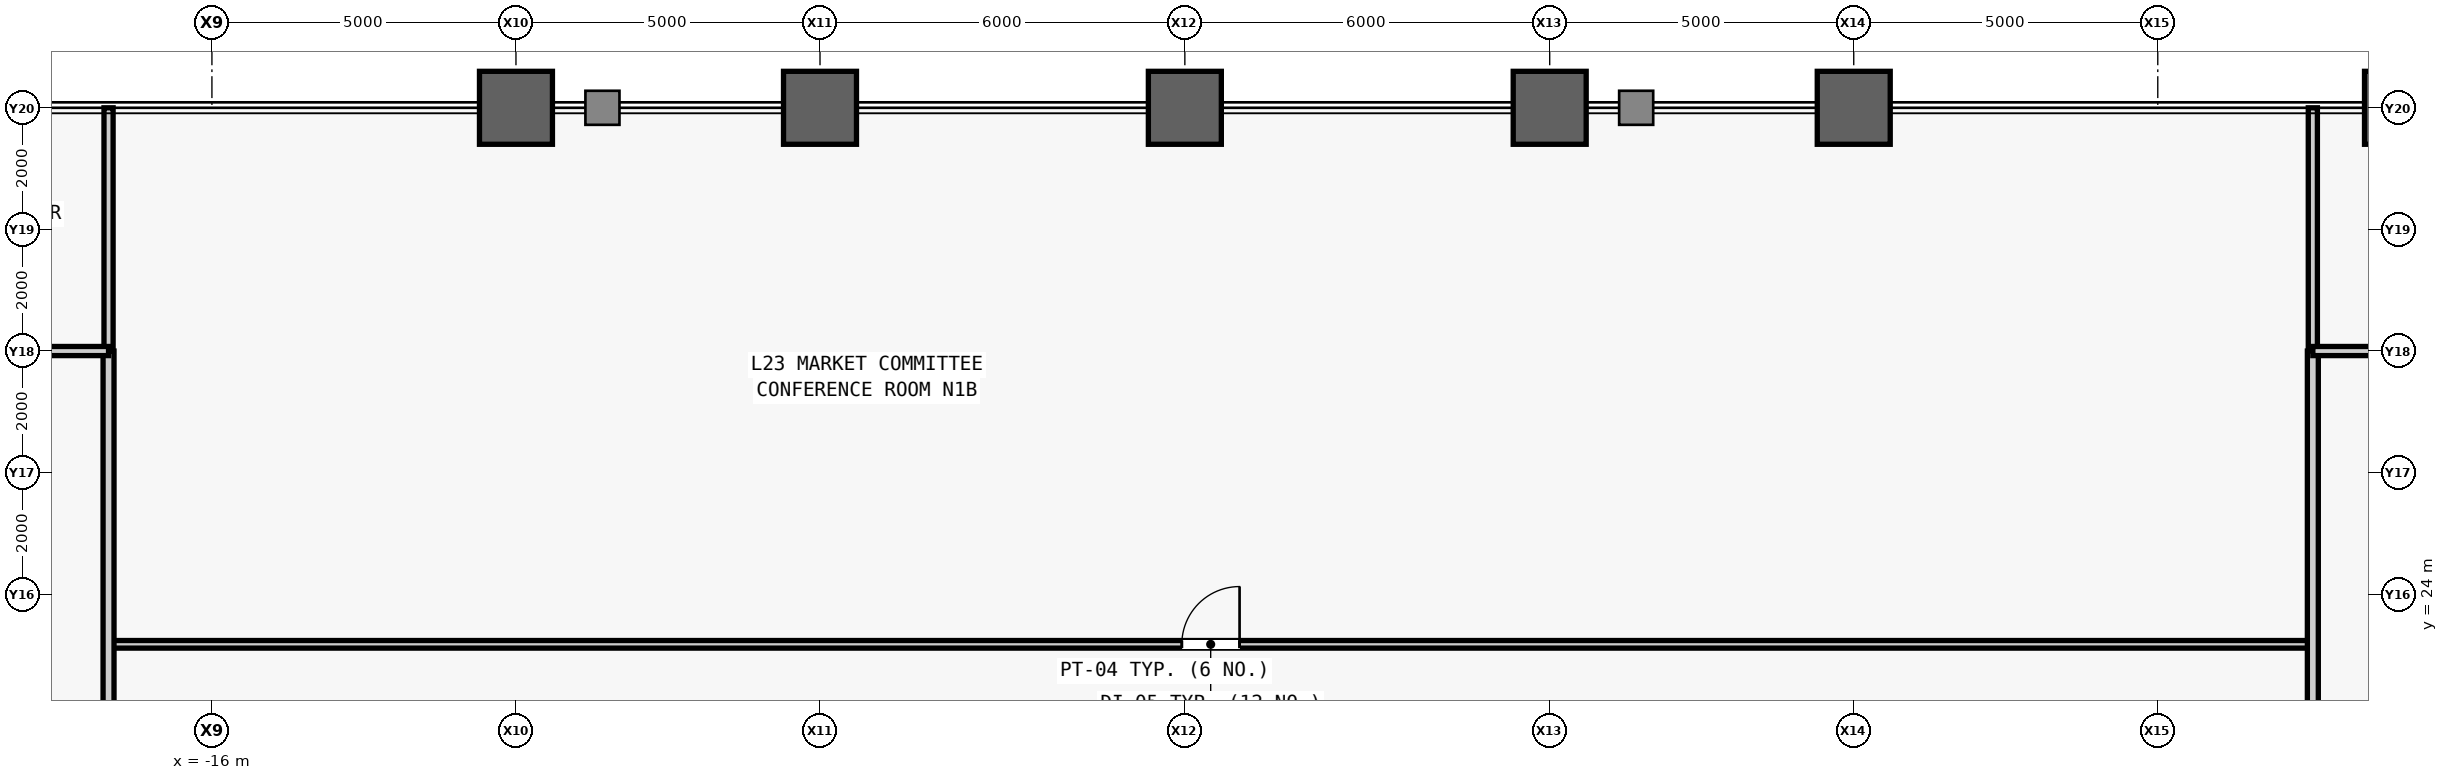
"""IFC4 building model, lengths in metres.
Left out: names, types, materials, properties, quantities, classifications, styles, units other than length and angle.
Written with IfcOpenShell. Run it as: python <this file> out.ifc"""

import sys

from ifc_helpers import new_model, si_unit, direction, frame, frame_2d, origin, origin_2d, place, context, subcontext, project, spatial, rectangle, hollow_rectangle, extrude, source, transform, mapped, element, fill, save


model = new_model("IFC4")
c1 = context("Model", 3, precision=1e-05, world=origin(), true_north=direction((0.0, 1.0)))
c2 = subcontext(c1, "Body", "Model", "MODEL_VIEW")
j1 = project(units=[si_unit("LENGTHUNIT", "METRE"), si_unit("PLANEANGLEUNIT", "RADIAN")], contexts=[c1])
p1 = place(None, origin())
s1 = spatial("IfcSite", under=j1, at=p1, CompositionType="ELEMENT")
p2 = place(p1, origin())
s2 = spatial("IfcBuilding", under=s1, at=p2, CompositionType="ELEMENT")
p3 = place(p2, frame((0.0, 0.0, 103.7)))
s3 = spatial("IfcBuildingStorey", under=s2, at=p3, CompositionType="ELEMENT", Elevation=103.7)
m1 = source(origin(), c2, "Body", "SweptSolid", [
    extrude(hollow_rectangle(XDim=1.2, YDim=1.2, WallThickness=0.07, at=origin_2d()), origin(), (0.0, 0.0, 1.0), 4.1),
])
for number, where, z_axis, x_axis in (
    (1, (-11.0, 32.0, 0.0), (0.0, 0.0, 1.0), (1.0, 0.0, 0.0)),
    (2, (-6.0, 32.0, 0.0), (0.0, 0.0, 1.0), (1.0, 0.0, 0.0)),
    (3, (0.0, 32.0, 0.0), (0.0, 0.0, 1.0), (1.0, 0.0, 0.0)),
    (4, (6.0, 32.0, 0.0), (0.0, 0.0, 1.0), (1.0, 0.0, 0.0)),
    (5, (11.0, 32.0, 0.0), (0.0, 0.0, 1.0), (1.0, 0.0, 0.0)),
    (6, (20.0, 32.0, 0.0), (0.0, 0.0, 1.0), (1.0, 0.0, 0.0)),
):
    element("IfcColumn", number, at=place(p3, frame(where, z_axis=z_axis, x_axis=x_axis)), inside=s3, PredefinedType="COLUMN", context=c2, shape_type="MappedRepresentation", body=[
        mapped(m1, transform((0.0, 0.0, 0.0), scale=1.0)),
    ])
m2 = source(origin(), c2, "Body", "SweptSolid", [
    extrude(rectangle(XDim=36.25, YDim=0.125, at=frame_2d((18.125, 0.0))), origin(), (0.0, 0.0, 1.0), 3.84),
])
p4 = place(p3, frame((-17.7, 23.177, 0.0), z_axis=(0.0, 0.0, 1.0), x_axis=(1.0, 0.0, 0.0)))
e7 = element("IfcWall", 7, at=p4, inside=s3, PredefinedType="PARTITIONING", context=c2, shape_type="MappedRepresentation", body=[
    mapped(m2, transform((0.0, 0.0, 0.0), scale=1.0)),
])
m3 = source(origin(), c2, "Body", "SweptSolid", [
    extrude(rectangle(XDim=0.95, YDim=2.15, at=frame_2d((0.475, 1.075))), frame((0.0, 0.073, 0.0), z_axis=(0.0, -1.0, 0.0), x_axis=(1.0, 0.0, 0.0)), (0.0, 0.0, 1.0), 0.145),
])
p5 = place(p4, frame((17.65, 0.0, 0.0)))
e8 = element("IfcOpeningElement", 8, at=p5, cuts=e7, PredefinedType="OPENING", context=c2, shape_type="MappedRepresentation", body=[
    mapped(m3, transform((0.0, 0.0, 0.0), scale=1.0)),
])
m4 = source(origin(), c2, "Body", "SweptSolid", [
    extrude(rectangle(XDim=4.0, YDim=0.15, at=frame_2d((2.0, 0.0))), origin(), (0.0, 0.0, 1.0), 3.84),
])
for number, where, z_axis, x_axis in (
    (9, (-17.7, 28.0, 0.0), (0.0, 0.0, 1.0), (0.0, 1.0, 0.0)),
    (10, (18.55, 28.0, 0.0), (0.0, 0.0, 1.0), (0.0, 1.0, 0.0)),
):
    element("IfcWall", number, at=place(p3, frame(where, z_axis=z_axis, x_axis=x_axis)), inside=s3, PredefinedType="PARTITIONING", context=c2, shape_type="MappedRepresentation", body=[
        mapped(m4, transform((0.0, 0.0, 0.0), scale=1.0)),
    ])
m5 = source(origin(), c2, "Body", "SweptSolid", [
    extrude(rectangle(XDim=56.0, YDim=0.18, at=frame_2d((28.0, 0.0))), origin(), (0.0, 0.0, 1.0), 3.84),
])
p6 = place(p3, frame((-17.7, -28.0, 0.0), z_axis=(0.0, 0.0, 1.0), x_axis=(0.0, 1.0, 0.0)))
e11 = element("IfcWall", 11, at=p6, inside=s3, PredefinedType="PARTITIONING", context=c2, shape_type="MappedRepresentation", body=[
    mapped(m5, transform((0.0, 0.0, 0.0), scale=1.0)),
])
m6 = source(origin(), c2, "Body", "SweptSolid", [
    extrude(rectangle(XDim=0.95, YDim=2.15, at=frame_2d((0.475, 1.075))), frame((0.0, 0.1, 0.0), z_axis=(0.0, -1.0, 0.0), x_axis=(1.0, 0.0, 0.0)), (0.0, 0.0, 1.0), 0.2),
])
p7 = place(p6, frame((20.593, 0.0, 0.0)))
e12 = element("IfcOpeningElement", 12, at=p7, cuts=e11, PredefinedType="OPENING", context=c2, shape_type="MappedRepresentation", body=[
    mapped(m6, transform((0.0, 0.0, 0.0), scale=1.0)),
])
p8 = place(p6, frame((34.143, 0.0, 0.0)))
e13 = element("IfcOpeningElement", 13, at=p8, cuts=e11, PredefinedType="OPENING", context=c2, shape_type="MappedRepresentation", body=[
    mapped(m6, transform((0.0, 0.0, 0.0), scale=1.0)),
])
p9 = place(p3, frame((18.55, -28.0, 0.0), z_axis=(0.0, 0.0, 1.0), x_axis=(0.0, 1.0, 0.0)))
e14 = element("IfcWall", 14, at=p9, inside=s3, PredefinedType="PARTITIONING", context=c2, shape_type="MappedRepresentation", body=[
    mapped(m5, transform((0.0, 0.0, 0.0), scale=1.0)),
])
p10 = place(p9, frame((19.036, 0.0, 0.0)))
e15 = element("IfcOpeningElement", 15, at=p10, cuts=e14, PredefinedType="OPENING", context=c2, shape_type="MappedRepresentation", body=[
    mapped(m6, transform((0.0, 0.0, 0.0), scale=1.0)),
])
p11 = place(p9, frame((28.358, 0.0, 0.0)))
e16 = element("IfcOpeningElement", 16, at=p11, cuts=e14, PredefinedType="OPENING", context=c2, shape_type="MappedRepresentation", body=[
    mapped(m6, transform((0.0, 0.0, 0.0), scale=1.0)),
])
p12 = place(p9, frame((37.397, 0.0, 0.0)))
e17 = element("IfcOpeningElement", 17, at=p12, cuts=e14, PredefinedType="OPENING", context=c2, shape_type="MappedRepresentation", body=[
    mapped(m6, transform((0.0, 0.0, 0.0), scale=1.0)),
])
m7 = source(origin(), c2, "Body", "SweptSolid", [
    extrude(rectangle(XDim=10.3, YDim=0.15, at=frame_2d((5.15, 0.0))), origin(), (0.0, 0.0, 1.0), 3.84),
])
p13 = place(p3, frame((-28.0, 28.0, 0.0), z_axis=(0.0, 0.0, 1.0), x_axis=(1.0, 0.0, 0.0)))
e18 = element("IfcWall", 18, at=p13, inside=s3, PredefinedType="PARTITIONING", context=c2, shape_type="MappedRepresentation", body=[
    mapped(m7, transform((0.0, 0.0, 0.0), scale=1.0)),
])
m8 = source(origin(), c2, "Body", "SweptSolid", [
    extrude(rectangle(XDim=0.95, YDim=2.15, at=frame_2d((0.475, 1.075))), frame((0.0, 0.085, 0.0), z_axis=(0.0, -1.0, 0.0), x_axis=(1.0, 0.0, 0.0)), (0.0, 0.0, 1.0), 0.17),
])
p14 = place(p13, frame((4.675, 0.0, 0.0)))
e19 = element("IfcOpeningElement", 19, at=p14, cuts=e18, PredefinedType="OPENING", context=c2, shape_type="MappedRepresentation", body=[
    mapped(m8, transform((0.0, 0.0, 0.0), scale=1.0)),
])
m9 = source(origin(), c2, "Body", "SweptSolid", [
    extrude(rectangle(XDim=9.45, YDim=0.15, at=frame_2d((4.725, 0.0))), origin(), (0.0, 0.0, 1.0), 3.84),
])
p15 = place(p3, frame((18.55, 28.0, 0.0), z_axis=(0.0, 0.0, 1.0), x_axis=(1.0, 0.0, 0.0)))
e20 = element("IfcWall", 20, at=p15, inside=s3, PredefinedType="PARTITIONING", context=c2, shape_type="MappedRepresentation", body=[
    mapped(m9, transform((0.0, 0.0, 0.0), scale=1.0)),
])
p16 = place(p15, frame((4.25, 0.0, 0.0)))
e21 = element("IfcOpeningElement", 21, at=p16, cuts=e20, PredefinedType="OPENING", context=c2, shape_type="MappedRepresentation", body=[
    mapped(m8, transform((0.0, 0.0, 0.0), scale=1.0)),
])
m10 = source(origin(), c2, "Body", "SweptSolid", [
    extrude(rectangle(XDim=0.95, YDim=2.15, at=frame_2d((0.475, 1.075))), frame((0.0, 0.025, 0.0), z_axis=(0.0, -1.0, 0.0), x_axis=(1.0, 0.0, 0.0)), (0.0, 0.0, 1.0), 0.05),
])
p17 = place(p5, origin())
e22 = element("IfcDoor", 22, at=p17, inside=s3, OperationType="SINGLE_SWING_RIGHT", PredefinedType="DOOR", context=c2, shape_type="MappedRepresentation", body=[
    mapped(m10, transform((0.0, 0.0, 0.0), scale=1.0)),
])
fill(e8, e22)
save(model, sys.argv[1])
